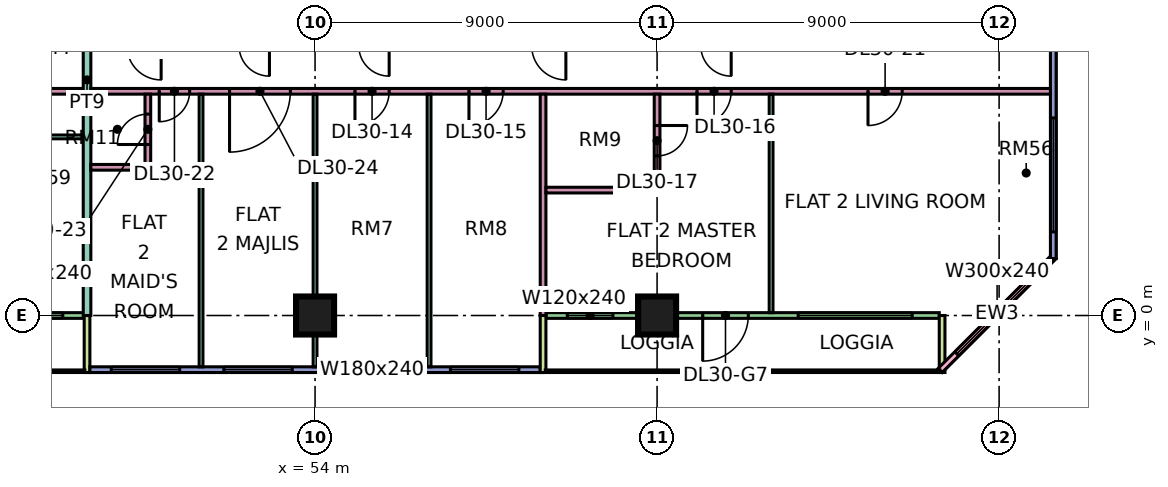
"""IFC4 building model, lengths in metres.
Left out: names, types, materials, properties, quantities, classifications, styles, units other than length and angle.
Written with IfcOpenShell. Run it as: python <this file> out.ifc"""

import sys

from ifc_helpers import new_model, si_unit, direction, frame, frame_2d, origin, origin_2d, place, context, subcontext, project, spatial, rectangle, extrude, element, fill, save


model = new_model("IFC4")
c1 = context("Model", 3, precision=1e-05, world=origin(), true_north=direction((0.0, 1.0)))
c2 = subcontext(c1, "Body", "Model", "MODEL_VIEW")
j1 = project(units=[si_unit("LENGTHUNIT", "METRE"), si_unit("PLANEANGLEUNIT", "RADIAN")], contexts=[c1])
p1 = place(None, origin())
s1 = spatial("IfcSite", under=j1, at=p1, CompositionType="ELEMENT")
p2 = place(p1, origin())
s2 = spatial("IfcBuilding", under=s1, at=p2, CompositionType="ELEMENT")
p3 = place(p2, frame((0.0, 0.0, 129.4)))
s3 = spatial("IfcBuildingStorey", under=s2, at=p3, CompositionType="ELEMENT", Elevation=129.4)
for number, where, z_axis, x_axis in (
    (1, (54.0, 0.0, 0.0), (0.0, 0.0, 1.0), (1.0, 0.0, 0.0)),
    (2, (63.0, 0.0, 0.0), (0.0, 0.0, 1.0), (1.0, 0.0, 0.0)),
):
    element("IfcColumn", number, at=place(p3, frame(where, z_axis=z_axis, x_axis=x_axis)), inside=s3, PredefinedType="COLUMN", context=c2, shape_type="SweptSolid", body=[
        extrude(rectangle(XDim=1.0, YDim=1.0, at=origin_2d()), origin(), (0.0, 0.0, 1.0), 3.75),
    ])
p4 = place(p3, frame((36.075, 0.0, 0.0), z_axis=(0.0, 0.0, 1.0), x_axis=(1.0, 0.0, 0.0)))
e3 = element("IfcWall", 3, at=p4, inside=s3, PredefinedType="SOLIDWALL", context=c2, shape_type="SweptSolid", body=[
    extrude(rectangle(XDim=11.85, YDim=0.15, at=frame_2d((5.925, 0.0))), origin(), (0.0, 0.0, 1.0), 3.35),
])
p5 = place(p4, frame((3.525, 0.0, 0.0)))
e4 = element("IfcOpeningElement", 4, at=p5, cuts=e3, PredefinedType="OPENING", context=c2, shape_type="SweptSolid", body=[
    extrude(rectangle(XDim=1.8, YDim=2.4, at=frame_2d((0.9, 1.2))), frame((0.0, 0.085, 0.0), z_axis=(0.0, -1.0, 0.0), x_axis=(1.0, 0.0, 0.0)), (0.0, 0.0, 1.0), 0.17),
])
p6 = place(p4, frame((10.087, 0.0, 0.45)))
e5 = element("IfcOpeningElement", 5, at=p6, cuts=e3, PredefinedType="OPENING", context=c2, shape_type="SweptSolid", body=[
    extrude(rectangle(XDim=1.2, YDim=2.4, at=frame_2d((0.6, 1.2))), frame((0.0, 0.085, 0.0), z_axis=(0.0, -1.0, 0.0), x_axis=(1.0, 0.0, 0.0)), (0.0, 0.0, 1.0), 0.17),
])
p7 = place(p3, frame((48.0, -1.5, 0.0), z_axis=(0.0, 0.0, 1.0), x_axis=(0.0, 1.0, 0.0)))
e6 = element("IfcWall", 6, at=p7, inside=s3, PredefinedType="SOLIDWALL", context=c2, shape_type="SweptSolid", body=[
    extrude(rectangle(XDim=1.5, YDim=0.15, at=frame_2d((0.75, 0.0))), origin(), (0.0, 0.0, 1.0), 3.35),
])
p8 = place(p3, frame((48.075, -1.425, 0.0), z_axis=(0.0, 0.0, 1.0), x_axis=(1.0, 0.0, 0.0)))
e7 = element("IfcWall", 7, at=p8, inside=s3, PredefinedType="SOLIDWALL", context=c2, shape_type="SweptSolid", body=[
    extrude(rectangle(XDim=11.85, YDim=0.15, at=frame_2d((5.925, 0.0))), origin(), (0.0, 0.0, 1.0), 3.35),
])
p9 = place(p8, frame((0.562, 0.0, 0.45)))
e8 = element("IfcOpeningElement", 8, at=p9, cuts=e7, PredefinedType="OPENING", context=c2, shape_type="SweptSolid", body=[
    extrude(rectangle(XDim=1.8, YDim=2.4, at=frame_2d((0.9, 1.2))), frame((0.0, 0.085, 0.0), z_axis=(0.0, -1.0, 0.0), x_axis=(1.0, 0.0, 0.0)), (0.0, 0.0, 1.0), 0.17),
])
p10 = place(p8, frame((3.525, 0.0, 0.45)))
e9 = element("IfcOpeningElement", 9, at=p10, cuts=e7, PredefinedType="OPENING", context=c2, shape_type="SweptSolid", body=[
    extrude(rectangle(XDim=1.8, YDim=2.4, at=frame_2d((0.9, 1.2))), frame((0.0, 0.085, 0.0), z_axis=(0.0, -1.0, 0.0), x_axis=(1.0, 0.0, 0.0)), (0.0, 0.0, 1.0), 0.17),
])
p11 = place(p8, frame((6.525, 0.0, 0.45)))
e10 = element("IfcOpeningElement", 10, at=p11, cuts=e7, PredefinedType="OPENING", context=c2, shape_type="SweptSolid", body=[
    extrude(rectangle(XDim=1.8, YDim=2.4, at=frame_2d((0.9, 1.2))), frame((0.0, 0.085, 0.0), z_axis=(0.0, -1.0, 0.0), x_axis=(1.0, 0.0, 0.0)), (0.0, 0.0, 1.0), 0.17),
])
p12 = place(p8, frame((9.488, 0.0, 0.45)))
e11 = element("IfcOpeningElement", 11, at=p12, cuts=e7, PredefinedType="OPENING", context=c2, shape_type="SweptSolid", body=[
    extrude(rectangle(XDim=1.8, YDim=2.4, at=frame_2d((0.9, 1.2))), frame((0.0, 0.085, 0.0), z_axis=(0.0, -1.0, 0.0), x_axis=(1.0, 0.0, 0.0)), (0.0, 0.0, 1.0), 0.17),
])
p13 = place(p3, frame((60.075, 0.0, 0.0), z_axis=(0.0, 0.0, 1.0), x_axis=(1.0, 0.0, 0.0)))
e12 = element("IfcWall", 12, at=p13, inside=s3, PredefinedType="SOLIDWALL", context=c2, shape_type="SweptSolid", body=[
    extrude(rectangle(XDim=10.35, YDim=0.15, at=frame_2d((5.175, 0.0))), origin(), (0.0, 0.0, 1.0), 3.35),
])
p14 = place(p13, frame((0.562, 0.0, 0.45)))
e13 = element("IfcOpeningElement", 13, at=p14, cuts=e12, PredefinedType="OPENING", context=c2, shape_type="SweptSolid", body=[
    extrude(rectangle(XDim=1.2, YDim=2.4, at=frame_2d((0.6, 1.2))), frame((0.0, 0.085, 0.0), z_axis=(0.0, -1.0, 0.0), x_axis=(1.0, 0.0, 0.0)), (0.0, 0.0, 1.0), 0.17),
])
p15 = place(p13, frame((4.125, 0.0, 0.0)))
e14 = element("IfcOpeningElement", 14, at=p15, cuts=e12, PredefinedType="OPENING", context=c2, shape_type="SweptSolid", body=[
    extrude(rectangle(XDim=1.2, YDim=2.4, at=frame_2d((0.6, 1.2))), frame((0.0, 0.085, 0.0), z_axis=(0.0, -1.0, 0.0), x_axis=(1.0, 0.0, 0.0)), (0.0, 0.0, 1.0), 0.17),
])
p16 = place(p13, frame((6.637, 0.0, 0.45)))
e15 = element("IfcOpeningElement", 15, at=p16, cuts=e12, PredefinedType="OPENING", context=c2, shape_type="SweptSolid", body=[
    extrude(rectangle(XDim=3.0, YDim=2.4, at=frame_2d((1.5, 1.2))), frame((0.0, 0.085, 0.0), z_axis=(0.0, -1.0, 0.0), x_axis=(1.0, 0.0, 0.0)), (0.0, 0.0, 1.0), 0.17),
])
for number, where, z_axis, x_axis in (
    (16, (60.0, -1.5, 0.0), (0.0, 0.0, 1.0), (0.0, 1.0, 0.0)),
    (17, (70.5, -1.5, 0.0), (0.0, 0.0, 1.0), (0.0, 1.0, 0.0)),
):
    element("IfcWall", number, at=place(p3, frame(where, z_axis=z_axis, x_axis=x_axis)), inside=s3, PredefinedType="SOLIDWALL", context=c2, shape_type="SweptSolid", body=[
        extrude(rectangle(XDim=1.5, YDim=0.15, at=frame_2d((0.75, 0.0))), origin(), (0.0, 0.0, 1.0), 3.35),
    ])
p17 = place(p3, frame((70.447, -1.447, 0.0), z_axis=(0.0, 0.0, 1.0), x_axis=(0.707106781187, 0.707106781187, 0.0)))
e18 = element("IfcWall", 18, at=p17, inside=s3, PredefinedType="SOLIDWALL", context=c2, shape_type="SweptSolid", body=[
    extrude(rectangle(XDim=4.243, YDim=0.15, at=frame_2d((2.121, 0.0))), origin(), (0.0, 0.0, 1.0), 3.35),
])
p18 = place(p17, frame((0.621, 0.0, 0.45)))
e19 = element("IfcOpeningElement", 19, at=p18, cuts=e18, PredefinedType="OPENING", context=c2, shape_type="SweptSolid", body=[
    extrude(rectangle(XDim=3.0, YDim=2.4, at=frame_2d((1.5, 1.2))), frame((0.0, 0.085, 0.0), z_axis=(0.0, -1.0, 0.0), x_axis=(1.0, 0.0, 0.0)), (0.0, 0.0, 1.0), 0.17),
])
p19 = place(p3, frame((73.425, 1.5, 0.0), z_axis=(0.0, 0.0, 1.0), x_axis=(0.0, 1.0, 0.0)))
e20 = element("IfcWall", 20, at=p19, inside=s3, PredefinedType="SOLIDWALL", context=c2, shape_type="SweptSolid", body=[
    extrude(rectangle(XDim=10.425, YDim=0.15, at=frame_2d((5.212, 0.0))), origin(), (0.0, 0.0, 1.0), 3.35),
])
p20 = place(p19, frame((0.7, 0.0, 0.45)))
e21 = element("IfcOpeningElement", 21, at=p20, cuts=e20, PredefinedType="OPENING", context=c2, shape_type="SweptSolid", body=[
    extrude(rectangle(XDim=3.0, YDim=2.4, at=frame_2d((1.5, 1.2))), frame((0.0, 0.085, 0.0), z_axis=(0.0, -1.0, 0.0), x_axis=(1.0, 0.0, 0.0)), (0.0, 0.0, 1.0), 0.17),
])
p21 = place(p3, frame((33.05, 4.7, 0.0), z_axis=(0.0, 0.0, 1.0), x_axis=(1.0, 0.0, 0.0)))
e22 = element("IfcWall", 22, at=p21, inside=s3, PredefinedType="PARTITIONING", context=c2, shape_type="SweptSolid", body=[
    extrude(rectangle(XDim=14.85, YDim=0.1, at=frame_2d((7.425, 0.0))), origin(), (0.0, 0.0, 1.0), 3.35),
])
p22 = place(p21, frame((1.0, 0.0, 0.0)))
e23 = element("IfcOpeningElement", 23, at=p22, cuts=e22, PredefinedType="OPENING", context=c2, shape_type="SweptSolid", body=[
    extrude(rectangle(XDim=0.9, YDim=2.1, at=frame_2d((0.45, 1.05))), frame((0.0, 0.06, 0.0), z_axis=(0.0, -1.0, 0.0), x_axis=(1.0, 0.0, 0.0)), (0.0, 0.0, 1.0), 0.12),
])
p23 = place(p21, frame((13.0, 0.0, 0.0)))
e24 = element("IfcOpeningElement", 24, at=p23, cuts=e22, PredefinedType="OPENING", context=c2, shape_type="SweptSolid", body=[
    extrude(rectangle(XDim=0.9, YDim=2.1, at=frame_2d((0.45, 1.05))), frame((0.0, 0.06, 0.0), z_axis=(0.0, -1.0, 0.0), x_axis=(1.0, 0.0, 0.0)), (0.0, 0.0, 1.0), 0.12),
])
p24 = place(p21, frame((7.0, 0.0, 0.0)))
e25 = element("IfcOpeningElement", 25, at=p24, cuts=e22, PredefinedType="OPENING", context=c2, shape_type="SweptSolid", body=[
    extrude(rectangle(XDim=0.9, YDim=2.1, at=frame_2d((0.45, 1.05))), frame((0.0, 0.06, 0.0), z_axis=(0.0, -1.0, 0.0), x_axis=(1.0, 0.0, 0.0)), (0.0, 0.0, 1.0), 0.12),
])
p25 = place(p3, frame((43.725, 5.9, 0.0), z_axis=(0.0, 0.0, 1.0), x_axis=(1.0, 0.0, 0.0)))
e26 = element("IfcWall", 26, at=p25, inside=s3, PredefinedType="PARTITIONING", context=c2, shape_type="SweptSolid", body=[
    extrude(rectangle(XDim=4.175, YDim=0.15, at=frame_2d((2.087, 0.0))), origin(), (0.0, 0.0, 1.0), 3.35),
])
p26 = place(p25, frame((1.675, 0.0, 0.0)))
e27 = element("IfcOpeningElement", 27, at=p26, cuts=e26, PredefinedType="OPENING", context=c2, shape_type="SweptSolid", body=[
    extrude(rectangle(XDim=0.8, YDim=2.1, at=frame_2d((0.4, 1.05))), frame((0.0, 0.085, 0.0), z_axis=(0.0, -1.0, 0.0), x_axis=(1.0, 0.0, 0.0)), (0.0, 0.0, 1.0), 0.17),
])
p27 = place(p3, frame((48.0, 0.0, 0.0), z_axis=(0.0, 0.0, 1.0), x_axis=(0.0, 1.0, 0.0)))
e28 = element("IfcWall", 28, at=p27, inside=s3, PredefinedType="PARTITIONING", context=c2, shape_type="SweptSolid", body=[
    extrude(rectangle(XDim=12.4, YDim=0.2, at=frame_2d((6.2, 0.0))), origin(), (0.0, 0.0, 1.0), 3.35),
])
p28 = place(p3, frame((48.1, 3.9, 0.0), z_axis=(0.0, 0.0, 1.0), x_axis=(1.0, 0.0, 0.0)))
e29 = element("IfcWall", 29, at=p28, inside=s3, PredefinedType="PARTITIONING", context=c2, shape_type="SweptSolid", body=[
    extrude(rectangle(XDim=1.425, YDim=0.15, at=frame_2d((0.712, 0.0))), origin(), (0.0, 0.0, 1.0), 3.35),
])
p29 = place(p3, frame((48.1, 5.9, 0.0), z_axis=(0.0, 0.0, 1.0), x_axis=(1.0, 0.0, 0.0)))
e30 = element("IfcWall", 30, at=p29, inside=s3, PredefinedType="PARTITIONING", context=c2, shape_type="SweptSolid", body=[
    extrude(rectangle(XDim=25.25, YDim=0.15, at=frame_2d((12.625, 0.0))), origin(), (0.0, 0.0, 1.0), 3.35),
])
p30 = place(p29, frame((6.95, 0.0, 0.0)))
e31 = element("IfcOpeningElement", 31, at=p30, cuts=e30, PredefinedType="OPENING", context=c2, shape_type="SweptSolid", body=[
    extrude(rectangle(XDim=0.9, YDim=2.1, at=frame_2d((0.45, 1.05))), frame((0.0, 0.085, 0.0), z_axis=(0.0, -1.0, 0.0), x_axis=(1.0, 0.0, 0.0)), (0.0, 0.0, 1.0), 0.17),
])
p31 = place(p29, frame((9.95, 0.0, 0.0)))
e32 = element("IfcOpeningElement", 32, at=p31, cuts=e30, PredefinedType="OPENING", context=c2, shape_type="SweptSolid", body=[
    extrude(rectangle(XDim=0.9, YDim=2.1, at=frame_2d((0.45, 1.05))), frame((0.0, 0.085, 0.0), z_axis=(0.0, -1.0, 0.0), x_axis=(1.0, 0.0, 0.0)), (0.0, 0.0, 1.0), 0.17),
])
p32 = place(p29, frame((15.95, 0.0, 0.0)))
e33 = element("IfcOpeningElement", 33, at=p32, cuts=e30, PredefinedType="OPENING", context=c2, shape_type="SweptSolid", body=[
    extrude(rectangle(XDim=0.9, YDim=2.1, at=frame_2d((0.45, 1.05))), frame((0.0, 0.085, 0.0), z_axis=(0.0, -1.0, 0.0), x_axis=(1.0, 0.0, 0.0)), (0.0, 0.0, 1.0), 0.17),
])
p33 = place(p29, frame((20.45, 0.0, 0.0)))
e34 = element("IfcOpeningElement", 34, at=p33, cuts=e30, PredefinedType="OPENING", context=c2, shape_type="SweptSolid", body=[
    extrude(rectangle(XDim=0.9, YDim=2.1, at=frame_2d((0.45, 1.05))), frame((0.0, 0.085, 0.0), z_axis=(0.0, -1.0, 0.0), x_axis=(1.0, 0.0, 0.0)), (0.0, 0.0, 1.0), 0.17),
])
p34 = place(p29, frame((1.8, 0.0, 0.0)))
e35 = element("IfcOpeningElement", 35, at=p34, cuts=e30, PredefinedType="OPENING", context=c2, shape_type="SweptSolid", body=[
    extrude(rectangle(XDim=0.8, YDim=2.1, at=frame_2d((0.4, 1.05))), frame((0.0, 0.085, 0.0), z_axis=(0.0, -1.0, 0.0), x_axis=(1.0, 0.0, 0.0)), (0.0, 0.0, 1.0), 0.17),
])
p35 = place(p29, frame((3.65, 0.0, 0.0)))
e36 = element("IfcOpeningElement", 36, at=p35, cuts=e30, PredefinedType="OPENING", context=c2, shape_type="SweptSolid", body=[
    extrude(rectangle(XDim=1.6, YDim=2.1, at=frame_2d((0.8, 1.05))), frame((0.0, 0.085, 0.0), z_axis=(0.0, -1.0, 0.0), x_axis=(1.0, 0.0, 0.0)), (0.0, 0.0, 1.0), 0.17),
])
p36 = place(p3, frame((49.6, 3.825, 0.0), z_axis=(0.0, 0.0, 1.0), x_axis=(0.0, 1.0, 0.0)))
e37 = element("IfcWall", 37, at=p36, inside=s3, PredefinedType="PARTITIONING", context=c2, shape_type="SweptSolid", body=[
    extrude(rectangle(XDim=2.0, YDim=0.15, at=frame_2d((1.0, 0.0))), origin(), (0.0, 0.0, 1.0), 3.35),
])
p37 = place(p36, frame((0.675, 0.0, 0.0)))
e38 = element("IfcOpeningElement", 38, at=p37, cuts=e37, PredefinedType="OPENING", context=c2, shape_type="SweptSolid", body=[
    extrude(rectangle(XDim=0.8, YDim=2.1, at=frame_2d((0.4, 1.05))), frame((0.0, 0.085, 0.0), z_axis=(0.0, -1.0, 0.0), x_axis=(1.0, 0.0, 0.0)), (0.0, 0.0, 1.0), 0.17),
])
for number, where, z_axis, x_axis in (
    (39, (51.0, -1.351, 0.0), (0.0, 0.0, 1.0), (0.0, 1.0, 0.0)),
    (40, (54.0, -1.351, 0.0), (0.0, 0.0, 1.0), (0.0, 1.0, 0.0)),
    (41, (57.0, -1.351, 0.0), (0.0, 0.0, 1.0), (0.0, 1.0, 0.0)),
):
    element("IfcWall", number, at=place(p3, frame(where, z_axis=z_axis, x_axis=x_axis)), inside=s3, PredefinedType="PARTITIONING", context=c2, shape_type="SweptSolid", body=[
        extrude(rectangle(XDim=7.176, YDim=0.1, at=frame_2d((3.588, 0.0))), origin(), (0.0, 0.0, 1.0), 3.35),
    ])
p38 = place(p3, frame((60.0, 0.0, 0.0), z_axis=(0.0, 0.0, 1.0), x_axis=(0.0, 1.0, 0.0)))
e42 = element("IfcWall", 42, at=p38, inside=s3, PredefinedType="PARTITIONING", context=c2, shape_type="SweptSolid", body=[
    extrude(rectangle(XDim=5.825, YDim=0.15, at=frame_2d((2.913, 0.0))), origin(), (0.0, 0.0, 1.0), 3.35),
])
p39 = place(p3, frame((60.075, 3.3, 0.0), z_axis=(0.0, 0.0, 1.0), x_axis=(1.0, 0.0, 0.0)))
e43 = element("IfcWall", 43, at=p39, inside=s3, PredefinedType="PARTITIONING", context=c2, shape_type="SweptSolid", body=[
    extrude(rectangle(XDim=3.0, YDim=0.15, at=frame_2d((1.5, 0.0))), origin(), (0.0, 0.0, 1.0), 3.35),
])
p40 = place(p3, frame((63.0, 3.375, 0.0), z_axis=(0.0, 0.0, 1.0), x_axis=(0.0, 1.0, 0.0)))
e44 = element("IfcWall", 44, at=p40, inside=s3, PredefinedType="PARTITIONING", context=c2, shape_type="SweptSolid", body=[
    extrude(rectangle(XDim=2.45, YDim=0.15, at=frame_2d((1.225, 0.0))), origin(), (0.0, 0.0, 1.0), 3.35),
])
p41 = place(p40, frame((0.825, 0.0, 0.0)))
e45 = element("IfcOpeningElement", 45, at=p41, cuts=e44, PredefinedType="OPENING", context=c2, shape_type="SweptSolid", body=[
    extrude(rectangle(XDim=0.8, YDim=2.1, at=frame_2d((0.4, 1.05))), frame((0.0, 0.085, 0.0), z_axis=(0.0, -1.0, 0.0), x_axis=(1.0, 0.0, 0.0)), (0.0, 0.0, 1.0), 0.17),
])
p42 = place(p3, frame((66.0, 0.074, 0.0), z_axis=(0.0, 0.0, 1.0), x_axis=(0.0, 1.0, 0.0)))
e46 = element("IfcWall", 46, at=p42, inside=s3, PredefinedType="PARTITIONING", context=c2, shape_type="SweptSolid", body=[
    extrude(rectangle(XDim=5.751, YDim=0.1, at=frame_2d((2.875, 0.0))), origin(), (0.0, 0.0, 1.0), 3.35),
])
p43 = place(p6, origin())
e47 = element("IfcWindow", 47, at=p43, inside=s3, PartitioningType="SINGLE_PANEL", PredefinedType="WINDOW", context=c2, shape_type="SweptSolid", body=[
    extrude(rectangle(XDim=1.2, YDim=2.4, at=frame_2d((0.6, 1.2))), frame((0.0, 0.03, 0.0), z_axis=(0.0, -1.0, 0.0), x_axis=(1.0, 0.0, 0.0)), (0.0, 0.0, 1.0), 0.06),
])
fill(e5, e47)
p44 = place(p9, origin())
e48 = element("IfcWindow", 48, at=p44, inside=s3, PartitioningType="SINGLE_PANEL", PredefinedType="WINDOW", context=c2, shape_type="SweptSolid", body=[
    extrude(rectangle(XDim=1.8, YDim=2.4, at=frame_2d((0.9, 1.2))), frame((0.0, 0.03, 0.0), z_axis=(0.0, -1.0, 0.0), x_axis=(1.0, 0.0, 0.0)), (0.0, 0.0, 1.0), 0.06),
])
fill(e8, e48)
p45 = place(p10, origin())
e49 = element("IfcWindow", 49, at=p45, inside=s3, PartitioningType="SINGLE_PANEL", PredefinedType="WINDOW", context=c2, shape_type="SweptSolid", body=[
    extrude(rectangle(XDim=1.8, YDim=2.4, at=frame_2d((0.9, 1.2))), frame((0.0, 0.03, 0.0), z_axis=(0.0, -1.0, 0.0), x_axis=(1.0, 0.0, 0.0)), (0.0, 0.0, 1.0), 0.06),
])
fill(e9, e49)
p46 = place(p11, origin())
e50 = element("IfcWindow", 50, at=p46, inside=s3, PartitioningType="SINGLE_PANEL", PredefinedType="WINDOW", context=c2, shape_type="SweptSolid", body=[
    extrude(rectangle(XDim=1.8, YDim=2.4, at=frame_2d((0.9, 1.2))), frame((0.0, 0.03, 0.0), z_axis=(0.0, -1.0, 0.0), x_axis=(1.0, 0.0, 0.0)), (0.0, 0.0, 1.0), 0.06),
])
fill(e10, e50)
p47 = place(p12, origin())
e51 = element("IfcWindow", 51, at=p47, inside=s3, PartitioningType="SINGLE_PANEL", PredefinedType="WINDOW", context=c2, shape_type="SweptSolid", body=[
    extrude(rectangle(XDim=1.8, YDim=2.4, at=frame_2d((0.9, 1.2))), frame((0.0, 0.03, 0.0), z_axis=(0.0, -1.0, 0.0), x_axis=(1.0, 0.0, 0.0)), (0.0, 0.0, 1.0), 0.06),
])
fill(e11, e51)
p48 = place(p14, origin())
e52 = element("IfcWindow", 52, at=p48, inside=s3, PartitioningType="SINGLE_PANEL", PredefinedType="WINDOW", context=c2, shape_type="SweptSolid", body=[
    extrude(rectangle(XDim=1.2, YDim=2.4, at=frame_2d((0.6, 1.2))), frame((0.0, 0.03, 0.0), z_axis=(0.0, -1.0, 0.0), x_axis=(1.0, 0.0, 0.0)), (0.0, 0.0, 1.0), 0.06),
])
fill(e13, e52)
p49 = place(p15, frame((1.2, 0.0, 0.0), z_axis=(0.0, 0.0, 1.0), x_axis=(-1.0, 0.0, 0.0)))
e53 = element("IfcDoor", 53, at=p49, inside=s3, OperationType="DOUBLE_DOOR_SINGLE_SWING", PredefinedType="DOOR", context=c2, shape_type="SweptSolid", body=[
    extrude(rectangle(XDim=1.2, YDim=2.4, at=frame_2d((0.6, 1.2))), frame((0.0, 0.025, 0.0), z_axis=(0.0, -1.0, 0.0), x_axis=(1.0, 0.0, 0.0)), (0.0, 0.0, 1.0), 0.05),
])
fill(e14, e53)
p50 = place(p16, origin())
e54 = element("IfcWindow", 54, at=p50, inside=s3, PartitioningType="SINGLE_PANEL", PredefinedType="WINDOW", context=c2, shape_type="SweptSolid", body=[
    extrude(rectangle(XDim=3.0, YDim=2.4, at=frame_2d((1.5, 1.2))), frame((0.0, 0.03, 0.0), z_axis=(0.0, -1.0, 0.0), x_axis=(1.0, 0.0, 0.0)), (0.0, 0.0, 1.0), 0.06),
])
fill(e15, e54)
p51 = place(p18, origin())
e55 = element("IfcWindow", 55, at=p51, inside=s3, PartitioningType="SINGLE_PANEL", PredefinedType="WINDOW", context=c2, shape_type="SweptSolid", body=[
    extrude(rectangle(XDim=3.0, YDim=2.4, at=frame_2d((1.5, 1.2))), frame((0.0, 0.03, 0.0), z_axis=(0.0, -1.0, 0.0), x_axis=(1.0, 0.0, 0.0)), (0.0, 0.0, 1.0), 0.06),
])
fill(e19, e55)
p52 = place(p20, origin())
e56 = element("IfcWindow", 56, at=p52, inside=s3, PartitioningType="SINGLE_PANEL", PredefinedType="WINDOW", context=c2, shape_type="SweptSolid", body=[
    extrude(rectangle(XDim=3.0, YDim=2.4, at=frame_2d((1.5, 1.2))), frame((0.0, 0.03, 0.0), z_axis=(0.0, -1.0, 0.0), x_axis=(1.0, 0.0, 0.0)), (0.0, 0.0, 1.0), 0.06),
])
fill(e21, e56)
p53 = place(p30, frame((0.9, 0.0, 0.0), z_axis=(0.0, 0.0, 1.0), x_axis=(-1.0, 0.0, 0.0)))
e57 = element("IfcDoor", 57, at=p53, inside=s3, OperationType="SINGLE_SWING_LEFT", PredefinedType="DOOR", context=c2, shape_type="SweptSolid", body=[
    extrude(rectangle(XDim=0.9, YDim=2.1, at=frame_2d((0.45, 1.05))), frame((0.0, 0.025, 0.0), z_axis=(0.0, -1.0, 0.0), x_axis=(1.0, 0.0, 0.0)), (0.0, 0.0, 1.0), 0.05),
])
fill(e31, e57)
p54 = place(p31, frame((0.9, 0.0, 0.0), z_axis=(0.0, 0.0, 1.0), x_axis=(-1.0, 0.0, 0.0)))
e58 = element("IfcDoor", 58, at=p54, inside=s3, OperationType="SINGLE_SWING_LEFT", PredefinedType="DOOR", context=c2, shape_type="SweptSolid", body=[
    extrude(rectangle(XDim=0.9, YDim=2.1, at=frame_2d((0.45, 1.05))), frame((0.0, 0.025, 0.0), z_axis=(0.0, -1.0, 0.0), x_axis=(1.0, 0.0, 0.0)), (0.0, 0.0, 1.0), 0.05),
])
fill(e32, e58)
p55 = place(p32, frame((0.9, 0.0, 0.0), z_axis=(0.0, 0.0, 1.0), x_axis=(-1.0, 0.0, 0.0)))
e59 = element("IfcDoor", 59, at=p55, inside=s3, OperationType="SINGLE_SWING_LEFT", PredefinedType="DOOR", context=c2, shape_type="SweptSolid", body=[
    extrude(rectangle(XDim=0.9, YDim=2.1, at=frame_2d((0.45, 1.05))), frame((0.0, 0.025, 0.0), z_axis=(0.0, -1.0, 0.0), x_axis=(1.0, 0.0, 0.0)), (0.0, 0.0, 1.0), 0.05),
])
fill(e33, e59)
p56 = place(p41, origin())
e60 = element("IfcDoor", 60, at=p56, inside=s3, OperationType="SINGLE_SWING_RIGHT", PredefinedType="DOOR", context=c2, shape_type="SweptSolid", body=[
    extrude(rectangle(XDim=0.8, YDim=2.1, at=frame_2d((0.4, 1.05))), frame((0.0, 0.025, 0.0), z_axis=(0.0, -1.0, 0.0), x_axis=(1.0, 0.0, 0.0)), (0.0, 0.0, 1.0), 0.05),
])
fill(e45, e60)
p57 = place(p33, frame((0.9, 0.0, 0.0), z_axis=(0.0, 0.0, 1.0), x_axis=(-1.0, 0.0, 0.0)))
e61 = element("IfcDoor", 61, at=p57, inside=s3, OperationType="SINGLE_SWING_LEFT", PredefinedType="DOOR", context=c2, shape_type="SweptSolid", body=[
    extrude(rectangle(XDim=0.9, YDim=2.1, at=frame_2d((0.45, 1.05))), frame((0.0, 0.025, 0.0), z_axis=(0.0, -1.0, 0.0), x_axis=(1.0, 0.0, 0.0)), (0.0, 0.0, 1.0), 0.05),
])
fill(e34, e61)
p58 = place(p34, frame((0.8, 0.0, 0.0), z_axis=(0.0, 0.0, 1.0), x_axis=(-1.0, 0.0, 0.0)))
e62 = element("IfcDoor", 62, at=p58, inside=s3, OperationType="SINGLE_SWING_LEFT", PredefinedType="DOOR", context=c2, shape_type="SweptSolid", body=[
    extrude(rectangle(XDim=0.8, YDim=2.1, at=frame_2d((0.4, 1.05))), frame((0.0, 0.025, 0.0), z_axis=(0.0, -1.0, 0.0), x_axis=(1.0, 0.0, 0.0)), (0.0, 0.0, 1.0), 0.05),
])
fill(e35, e62)
p59 = place(p37, origin())
e63 = element("IfcDoor", 63, at=p59, inside=s3, OperationType="SINGLE_SWING_LEFT", PredefinedType="DOOR", context=c2, shape_type="SweptSolid", body=[
    extrude(rectangle(XDim=0.8, YDim=2.1, at=frame_2d((0.4, 1.05))), frame((0.0, 0.025, 0.0), z_axis=(0.0, -1.0, 0.0), x_axis=(1.0, 0.0, 0.0)), (0.0, 0.0, 1.0), 0.05),
])
fill(e38, e63)
p60 = place(p35, frame((1.6, 0.0, 0.0), z_axis=(0.0, 0.0, 1.0), x_axis=(-1.0, 0.0, 0.0)))
e64 = element("IfcDoor", 64, at=p60, inside=s3, OperationType="DOUBLE_DOOR_SINGLE_SWING", PredefinedType="DOOR", context=c2, shape_type="SweptSolid", body=[
    extrude(rectangle(XDim=1.6, YDim=2.1, at=frame_2d((0.8, 1.05))), frame((0.0, 0.025, 0.0), z_axis=(0.0, -1.0, 0.0), x_axis=(1.0, 0.0, 0.0)), (0.0, 0.0, 1.0), 0.05),
])
fill(e36, e64)
save(model, sys.argv[1])
